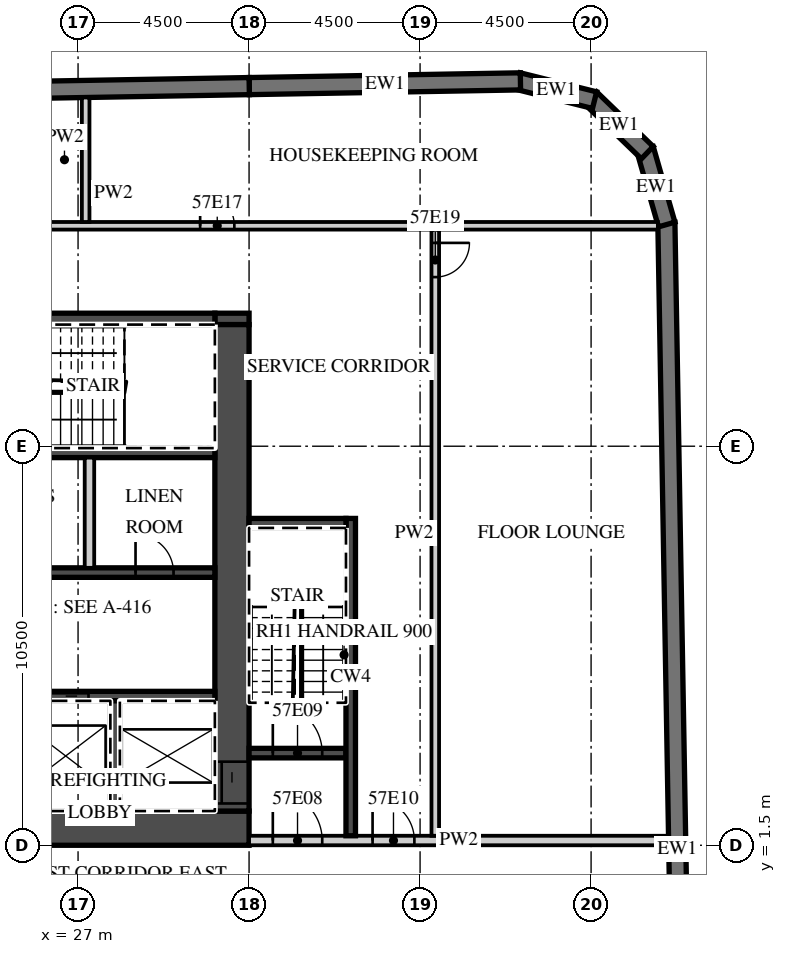
"""IFC4 building model, lengths in metres.
Left out: names, types, materials, properties, quantities, classifications, styles, units other than length and angle.
Written with IfcOpenShell. Run it as: python <this file> out.ifc"""

import sys

from ifc_helpers import new_model, si_unit, direction, frame, frame_2d, origin, place, context, subcontext, project, spatial, polyline, rectangle, outline, extrude, element, fill, save


model = new_model("IFC4")
c1 = context("Model", 3, precision=1e-05, world=origin(), true_north=direction((0.0, 1.0)))
c2 = subcontext(c1, "Body", "Model", "MODEL_VIEW")
j1 = project(units=[si_unit("LENGTHUNIT", "METRE"), si_unit("PLANEANGLEUNIT", "RADIAN")], contexts=[c1])
p1 = place(None, origin())
s1 = spatial("IfcSite", under=j1, at=p1, CompositionType="ELEMENT")
p2 = place(p1, origin())
s2 = spatial("IfcBuilding", under=s1, at=p2, CompositionType="ELEMENT")
p3 = place(p2, frame((0.0, 0.0, 234.2)))
s3 = spatial("IfcBuildingStorey", under=s2, at=p3, CompositionType="ELEMENT", Elevation=234.2)
p4 = place(p3, frame((43.057, -15.103, 0.0), z_axis=(0.0, 0.0, 1.0), x_axis=(-0.017452408953, 0.999847695112, 0.0)))
e1 = element("IfcWall", 1, at=p4, inside=s3, PredefinedType="SOLIDWALL", context=c2, shape_type="SweptSolid", body=[
    extrude(rectangle(XDim=33.0, YDim=0.45, at=frame_2d((16.5, 0.0))), origin(), (0.0, 0.0, 1.0), 3.02),
])
p5 = place(p3, frame((42.49, 17.833, 0.0), z_axis=(0.0, 0.0, 1.0), x_axis=(-0.275546368831, 0.961287781377, 0.0)))
e2 = element("IfcWall", 2, at=p5, inside=s3, PredefinedType="SOLIDWALL", context=c2, shape_type="SweptSolid", body=[
    extrude(outline(polyline([(0.0, -0.225), (2.071, -0.225), (1.95, 0.225), (0.121, 0.225), (0.0, -0.225)])), origin(), (0.0, 0.0, 1.0), 3.02),
])
p6 = place(p3, frame((41.979, 19.724, 0.0), z_axis=(0.0, 0.0, 1.0), x_axis=(-0.719379111448, 0.694617660308, 0.0)))
e3 = element("IfcWall", 3, at=p6, inside=s3, PredefinedType="SOLIDWALL", context=c2, shape_type="SweptSolid", body=[
    extrude(outline(polyline([(0.0, -0.225), (2.071, -0.225), (1.95, 0.225), (0.121, 0.225), (0.0, -0.225)])), origin(), (0.0, 0.0, 1.0), 3.02),
])
p7 = place(p3, frame((40.591, 21.106, 0.0), z_axis=(0.0, 0.0, 1.0), x_axis=(-0.970287979719, 0.241952963225, 0.0)))
e4 = element("IfcWall", 4, at=p7, inside=s3, PredefinedType="SOLIDWALL", context=c2, shape_type="SweptSolid", body=[
    extrude(outline(polyline([(0.0, -0.225), (2.071, -0.225), (1.95, 0.225), (0.121, 0.225), (0.0, -0.225)])), origin(), (0.0, 0.0, 1.0), 3.02),
])
p8 = place(p3, frame((38.641, 21.6, 0.0), z_axis=(0.0, 0.0, 1.0), x_axis=(-0.999847245074, -0.017478172627, 0.0)))
e5 = element("IfcWall", 5, at=p8, inside=s3, PredefinedType="SOLIDWALL", context=c2, shape_type="SweptSolid", body=[
    extrude(rectangle(XDim=7.138, YDim=0.45, at=frame_2d((3.569, 0.0))), origin(), (0.0, 0.0, 1.0), 3.02),
])
p9 = place(p3, frame((31.504, 21.476, 0.0), z_axis=(0.0, 0.0, 1.0), x_axis=(-0.999847677887, -0.017453395744, 0.0)))
e6 = element("IfcWall", 6, at=p9, inside=s3, PredefinedType="SOLIDWALL", context=c2, shape_type="SweptSolid", body=[
    extrude(rectangle(XDim=18.003, YDim=0.45, at=frame_2d((9.001, 0.0))), origin(), (0.0, 0.0, 1.0), 3.02),
])
p10 = place(p3, frame((13.5, 1.95, 0.0), z_axis=(0.0, 0.0, 1.0), x_axis=(1.0, 0.0, 0.0)))
e7 = element("IfcWall", 7, at=p10, inside=s3, PredefinedType="SHEAR", context=c2, shape_type="SweptSolid", body=[
    extrude(rectangle(XDim=18.0, YDim=0.9, at=frame_2d((9.0, 0.0))), origin(), (0.0, 0.0, 1.0), 3.02),
])
p11 = place(p10, frame((1.475, 0.0, 0.0)))
e8 = element("IfcOpeningElement", 8, at=p11, cuts=e7, PredefinedType="OPENING", context=c2, shape_type="SweptSolid", body=[
    extrude(rectangle(XDim=1.8, YDim=2.1, at=frame_2d((0.9, 1.05))), frame((0.0, 0.46, 0.0), z_axis=(0.0, -1.0, 0.0), x_axis=(1.0, 0.0, 0.0)), (0.0, 0.0, 1.0), 0.92),
])
p12 = place(p3, frame((30.6, 15.35, 0.0), z_axis=(0.0, 0.0, 1.0), x_axis=(1.0, 0.0, 0.0)))
e9 = element("IfcWall", 9, at=p12, inside=s3, PredefinedType="SHEAR", context=c2, shape_type="SweptSolid", body=[
    extrude(rectangle(XDim=0.9, YDim=0.3, at=frame_2d((0.45, 0.0))), origin(), (0.0, 0.0, 1.0), 3.02),
])
p13 = place(p3, frame((20.3, 15.35, 0.0), z_axis=(0.0, 0.0, 1.0), x_axis=(1.0, 0.0, 0.0)))
e10 = element("IfcWall", 10, at=p13, inside=s3, PredefinedType="SHEAR", context=c2, shape_type="SweptSolid", body=[
    extrude(rectangle(XDim=10.3, YDim=0.3, at=frame_2d((5.15, 0.0))), origin(), (0.0, 0.0, 1.0), 3.02),
])
p14 = place(p13, frame((4.0, 0.0, 0.0)))
e11 = element("IfcOpeningElement", 11, at=p14, cuts=e10, PredefinedType="OPENING", context=c2, shape_type="SweptSolid", body=[
    extrude(rectangle(XDim=1.3, YDim=2.1, at=frame_2d((0.65, 1.05))), frame((0.0, 0.16, 0.0), z_axis=(0.0, -1.0, 0.0), x_axis=(1.0, 0.0, 0.0)), (0.0, 0.0, 1.0), 0.32),
])
p15 = place(p13, frame((2.288, 0.0, 0.0)))
e12 = element("IfcOpeningElement", 12, at=p15, cuts=e10, PredefinedType="OPENING", context=c2, shape_type="SweptSolid", body=[
    extrude(rectangle(XDim=0.9, YDim=2.1, at=frame_2d((0.45, 1.05))), frame((0.0, 0.16, 0.0), z_axis=(0.0, -1.0, 0.0), x_axis=(1.0, 0.0, 0.0)), (0.0, 0.0, 1.0), 0.32),
])
p16 = place(p13, frame((0.462, 0.0, 0.0)))
e13 = element("IfcOpeningElement", 13, at=p16, cuts=e10, PredefinedType="OPENING", context=c2, shape_type="SweptSolid", body=[
    extrude(rectangle(XDim=0.9, YDim=2.1, at=frame_2d((0.45, 1.05))), frame((0.0, 0.16, 0.0), z_axis=(0.0, -1.0, 0.0), x_axis=(1.0, 0.0, 0.0)), (0.0, 0.0, 1.0), 0.32),
])
p17 = place(p3, frame((31.05, 2.4, 0.0), z_axis=(0.0, 0.0, 1.0), x_axis=(0.0, 1.0, 0.0)))
e14 = element("IfcWall", 14, at=p17, inside=s3, PredefinedType="SHEAR", context=c2, shape_type="SweptSolid", body=[
    extrude(rectangle(XDim=12.8, YDim=0.9, at=frame_2d((6.4, 0.0))), origin(), (0.0, 0.0, 1.0), 3.02),
])
p18 = place(p17, frame((0.2, 0.0, 0.0)))
e15 = element("IfcOpeningElement", 15, at=p18, cuts=e14, PredefinedType="OPENING", context=c2, shape_type="SweptSolid", body=[
    extrude(rectangle(XDim=1.1, YDim=2.1, at=frame_2d((0.55, 1.05))), frame((0.0, 0.46, 0.0), z_axis=(0.0, -1.0, 0.0), x_axis=(1.0, 0.0, 0.0)), (0.0, 0.0, 1.0), 0.92),
])
p19 = place(p3, frame((17.6, 5.425, 0.0), z_axis=(0.0, 0.0, 1.0), x_axis=(1.0, 0.0, 0.0)))
e16 = element("IfcWall", 16, at=p19, inside=s3, PredefinedType="SHEAR", context=c2, shape_type="SweptSolid", body=[
    extrude(rectangle(XDim=13.0, YDim=0.25, at=frame_2d((6.5, 0.0))), origin(), (0.0, 0.0, 1.0), 3.02),
])
p20 = place(p19, frame((8.475, 0.0, 0.0)))
e17 = element("IfcOpeningElement", 17, at=p20, cuts=e16, PredefinedType="OPENING", context=c2, shape_type="SweptSolid", body=[
    extrude(rectangle(XDim=1.2, YDim=2.1, at=frame_2d((0.6, 1.05))), frame((0.0, 0.135, 0.0), z_axis=(0.0, -1.0, 0.0), x_axis=(1.0, 0.0, 0.0)), (0.0, 0.0, 1.0), 0.27),
])
p21 = place(p19, frame((5.875, 0.0, 0.0)))
e18 = element("IfcOpeningElement", 18, at=p21, cuts=e16, PredefinedType="OPENING", context=c2, shape_type="SweptSolid", body=[
    extrude(rectangle(XDim=1.2, YDim=2.1, at=frame_2d((0.6, 1.05))), frame((0.0, 0.135, 0.0), z_axis=(0.0, -1.0, 0.0), x_axis=(1.0, 0.0, 0.0)), (0.0, 0.0, 1.0), 0.27),
])
p22 = place(p3, frame((27.975, 2.4, 0.0), z_axis=(0.0, 0.0, 1.0), x_axis=(0.0, 1.0, 0.0)))
e19 = element("IfcWall", 19, at=p22, inside=s3, PredefinedType="SHEAR", context=c2, shape_type="SweptSolid", body=[
    extrude(rectangle(XDim=2.9, YDim=0.25, at=frame_2d((1.45, 0.0))), origin(), (0.0, 0.0, 1.0), 3.02),
])
p23 = place(p3, frame((14.4, 8.675, 0.0), z_axis=(0.0, 0.0, 1.0), x_axis=(1.0, 0.0, 0.0)))
e20 = element("IfcWall", 20, at=p23, inside=s3, PredefinedType="SHEAR", context=c2, shape_type="SweptSolid", body=[
    extrude(rectangle(XDim=16.2, YDim=0.25, at=frame_2d((8.1, 0.0))), origin(), (0.0, 0.0, 1.0), 3.02),
])
p24 = place(p23, frame((6.45, 0.0, 0.0)))
e21 = element("IfcOpeningElement", 21, at=p24, cuts=e20, PredefinedType="OPENING", context=c2, shape_type="SweptSolid", body=[
    extrude(rectangle(XDim=1.2, YDim=2.1, at=frame_2d((0.6, 1.05))), frame((0.0, 0.135, 0.0), z_axis=(0.0, -1.0, 0.0), x_axis=(1.0, 0.0, 0.0)), (0.0, 0.0, 1.0), 0.27),
])
p25 = place(p23, frame((3.8, 0.0, 0.0)))
e22 = element("IfcOpeningElement", 22, at=p25, cuts=e20, PredefinedType="OPENING", context=c2, shape_type="SweptSolid", body=[
    extrude(rectangle(XDim=1.2, YDim=2.1, at=frame_2d((0.6, 1.05))), frame((0.0, 0.135, 0.0), z_axis=(0.0, -1.0, 0.0), x_axis=(1.0, 0.0, 0.0)), (0.0, 0.0, 1.0), 0.27),
])
p26 = place(p23, frame((0.65, 0.0, 0.0)))
e23 = element("IfcOpeningElement", 23, at=p26, cuts=e20, PredefinedType="OPENING", context=c2, shape_type="SweptSolid", body=[
    extrude(rectangle(XDim=1.3, YDim=2.1, at=frame_2d((0.65, 1.05))), frame((0.0, 0.135, 0.0), z_axis=(0.0, -1.0, 0.0), x_axis=(1.0, 0.0, 0.0)), (0.0, 0.0, 1.0), 0.27),
])
p27 = place(p23, frame((14.113, 0.0, 0.0)))
e24 = element("IfcOpeningElement", 24, at=p27, cuts=e20, PredefinedType="OPENING", context=c2, shape_type="SweptSolid", body=[
    extrude(rectangle(XDim=1.0, YDim=2.1, at=frame_2d((0.5, 1.05))), frame((0.0, 0.135, 0.0), z_axis=(0.0, -1.0, 0.0), x_axis=(1.0, 0.0, 0.0)), (0.0, 0.0, 1.0), 0.27),
])
p28 = place(p23, frame((10.137, 0.0, 0.0)))
e25 = element("IfcOpeningElement", 25, at=p28, cuts=e20, PredefinedType="OPENING", context=c2, shape_type="SweptSolid", body=[
    extrude(rectangle(XDim=1.0, YDim=2.1, at=frame_2d((0.5, 1.05))), frame((0.0, 0.135, 0.0), z_axis=(0.0, -1.0, 0.0), x_axis=(1.0, 0.0, 0.0)), (0.0, 0.0, 1.0), 0.27),
])
p29 = place(p3, frame((17.35, 11.825, 0.0), z_axis=(0.0, 0.0, 1.0), x_axis=(1.0, 0.0, 0.0)))
e26 = element("IfcWall", 26, at=p29, inside=s3, PredefinedType="SHEAR", context=c2, shape_type="SweptSolid", body=[
    extrude(rectangle(XDim=13.25, YDim=0.25, at=frame_2d((6.625, 0.0))), origin(), (0.0, 0.0, 1.0), 3.02),
])
p30 = place(p3, frame((27.3, 8.8, 0.0), z_axis=(0.0, 0.0, 1.0), x_axis=(0.0, 1.0, 0.0)))
e27 = element("IfcWall", 27, at=p30, inside=s3, PredefinedType="PARTITIONING", context=c2, shape_type="SweptSolid", body=[
    extrude(rectangle(XDim=2.9, YDim=0.25, at=frame_2d((1.45, 0.0))), origin(), (0.0, 0.0, 1.0), 3.02),
])
p31 = place(p3, frame((31.5, 1.625, 0.0), z_axis=(0.0, 0.0, 1.0), x_axis=(1.0, 0.0, 0.0)))
e28 = element("IfcWall", 28, at=p31, inside=s3, PredefinedType="PARTITIONING", context=c2, shape_type="SweptSolid", body=[
    extrude(rectangle(XDim=11.04, YDim=0.25, at=frame_2d((5.52, 0.0))), origin(), (0.0, 0.0, 1.0), 3.02),
])
p32 = place(p31, frame((0.625, 0.0, 0.0)))
e29 = element("IfcOpeningElement", 29, at=p32, cuts=e28, PredefinedType="OPENING", context=c2, shape_type="SweptSolid", body=[
    extrude(rectangle(XDim=1.3, YDim=2.1, at=frame_2d((0.65, 1.05))), frame((0.0, 0.135, 0.0), z_axis=(0.0, -1.0, 0.0), x_axis=(1.0, 0.0, 0.0)), (0.0, 0.0, 1.0), 0.27),
])
p33 = place(p31, frame((3.25, 0.0, 0.0)))
e30 = element("IfcOpeningElement", 30, at=p33, cuts=e28, PredefinedType="OPENING", context=c2, shape_type="SweptSolid", body=[
    extrude(rectangle(XDim=1.1, YDim=2.1, at=frame_2d((0.55, 1.05))), frame((0.0, 0.135, 0.0), z_axis=(0.0, -1.0, 0.0), x_axis=(1.0, 0.0, 0.0)), (0.0, 0.0, 1.0), 0.27),
])
p34 = place(p3, frame((31.5, 3.925, 0.0), z_axis=(0.0, 0.0, 1.0), x_axis=(1.0, 0.0, 0.0)))
e31 = element("IfcWall", 31, at=p34, inside=s3, PredefinedType="SHEAR", context=c2, shape_type="SweptSolid", body=[
    extrude(rectangle(XDim=2.55, YDim=0.25, at=frame_2d((1.275, 0.0))), origin(), (0.0, 0.0, 1.0), 3.02),
])
p35 = place(p34, frame((0.625, 0.0, 0.0)))
e32 = element("IfcOpeningElement", 32, at=p35, cuts=e31, PredefinedType="OPENING", context=c2, shape_type="SweptSolid", body=[
    extrude(rectangle(XDim=1.3, YDim=2.1, at=frame_2d((0.65, 1.05))), frame((0.0, 0.135, 0.0), z_axis=(0.0, -1.0, 0.0), x_axis=(1.0, 0.0, 0.0)), (0.0, 0.0, 1.0), 0.27),
])
p36 = place(p3, frame((34.175, 1.75, 0.0), z_axis=(0.0, 0.0, 1.0), x_axis=(0.0, 1.0, 0.0)))
e33 = element("IfcWall", 33, at=p36, inside=s3, PredefinedType="SHEAR", context=c2, shape_type="SweptSolid", body=[
    extrude(rectangle(XDim=8.35, YDim=0.25, at=frame_2d((4.175, 0.0))), origin(), (0.0, 0.0, 1.0), 3.02),
])
p37 = place(p3, frame((31.5, 9.975, 0.0), z_axis=(0.0, 0.0, 1.0), x_axis=(1.0, 0.0, 0.0)))
e34 = element("IfcWall", 34, at=p37, inside=s3, PredefinedType="SHEAR", context=c2, shape_type="SweptSolid", body=[
    extrude(rectangle(XDim=2.55, YDim=0.25, at=frame_2d((1.275, 0.0))), origin(), (0.0, 0.0, 1.0), 3.02),
])
p38 = place(p3, frame((36.4, 1.75, 0.0), z_axis=(0.0, 0.0, 1.0), x_axis=(0.0, 1.0, 0.0)))
e35 = element("IfcWall", 35, at=p38, inside=s3, PredefinedType="PARTITIONING", context=c2, shape_type="SweptSolid", body=[
    extrude(rectangle(XDim=15.95, YDim=0.2, at=frame_2d((7.975, 0.0))), origin(), (0.0, 0.0, 1.0), 3.02),
])
p39 = place(p38, frame((14.7, 0.0, 0.0)))
e36 = element("IfcOpeningElement", 36, at=p39, cuts=e35, PredefinedType="OPENING", context=c2, shape_type="SweptSolid", body=[
    extrude(rectangle(XDim=0.9, YDim=2.1, at=frame_2d((0.45, 1.05))), frame((0.0, 0.11, 0.0), z_axis=(0.0, -1.0, 0.0), x_axis=(1.0, 0.0, 0.0)), (0.0, 0.0, 1.0), 0.22),
])
p40 = place(p3, frame((13.6, 17.8, 0.0), z_axis=(0.0, 0.0, 1.0), x_axis=(1.0, 0.0, 0.0)))
e37 = element("IfcWall", 37, at=p40, inside=s3, PredefinedType="PARTITIONING", context=c2, shape_type="SweptSolid", body=[
    extrude(rectangle(XDim=28.657, YDim=0.2, at=frame_2d((14.329, 0.0))), origin(), (0.0, 0.0, 1.0), 3.02),
])
p41 = place(p40, frame((16.613, 0.0, 0.0)))
e38 = element("IfcOpeningElement", 38, at=p41, cuts=e37, PredefinedType="OPENING", context=c2, shape_type="SweptSolid", body=[
    extrude(rectangle(XDim=0.9, YDim=2.1, at=frame_2d((0.45, 1.05))), frame((0.0, 0.11, 0.0), z_axis=(0.0, -1.0, 0.0), x_axis=(1.0, 0.0, 0.0)), (0.0, 0.0, 1.0), 0.22),
])
p42 = place(p40, frame((8.312, 0.0, 0.0)))
e39 = element("IfcOpeningElement", 39, at=p42, cuts=e37, PredefinedType="OPENING", context=c2, shape_type="SweptSolid", body=[
    extrude(rectangle(XDim=0.9, YDim=2.1, at=frame_2d((0.45, 1.05))), frame((0.0, 0.11, 0.0), z_axis=(0.0, -1.0, 0.0), x_axis=(1.0, 0.0, 0.0)), (0.0, 0.0, 1.0), 0.22),
])
p43 = place(p3, frame((27.2, 17.9, 0.0), z_axis=(0.0, 0.0, 1.0), x_axis=(0.0, 1.0, 0.0)))
e40 = element("IfcWall", 40, at=p43, inside=s3, PredefinedType="PARTITIONING", context=c2, shape_type="SweptSolid", body=[
    extrude(rectangle(XDim=3.276, YDim=0.2, at=frame_2d((1.638, 0.0))), origin(), (0.0, 0.0, 1.0), 3.02),
])
p44 = place(p20, origin())
e41 = element("IfcDoor", 41, at=p44, inside=s3, OperationType="SLIDING_TO_LEFT", PredefinedType="DOOR", context=c2, shape_type="SweptSolid", body=[
    extrude(rectangle(XDim=1.2, YDim=2.1, at=frame_2d((0.6, 1.05))), frame((0.0, 0.025, 0.0), z_axis=(0.0, -1.0, 0.0), x_axis=(1.0, 0.0, 0.0)), (0.0, 0.0, 1.0), 0.05),
])
fill(e17, e41)
p45 = place(p18, origin())
e42 = element("IfcDoor", 42, at=p45, inside=s3, OperationType="SLIDING_TO_LEFT", PredefinedType="DOOR", context=c2, shape_type="SweptSolid", body=[
    extrude(rectangle(XDim=1.1, YDim=2.1, at=frame_2d((0.55, 1.05))), frame((0.0, 0.025, 0.0), z_axis=(0.0, -1.0, 0.0), x_axis=(1.0, 0.0, 0.0)), (0.0, 0.0, 1.0), 0.05),
])
fill(e15, e42)
p46 = place(p32, origin())
e43 = element("IfcDoor", 43, at=p46, inside=s3, OperationType="SINGLE_SWING_LEFT", PredefinedType="DOOR", context=c2, shape_type="SweptSolid", body=[
    extrude(rectangle(XDim=1.3, YDim=2.1, at=frame_2d((0.65, 1.05))), frame((0.0, 0.025, 0.0), z_axis=(0.0, -1.0, 0.0), x_axis=(1.0, 0.0, 0.0)), (0.0, 0.0, 1.0), 0.05),
])
fill(e29, e43)
p47 = place(p35, origin())
e44 = element("IfcDoor", 44, at=p47, inside=s3, OperationType="SINGLE_SWING_LEFT", PredefinedType="DOOR", context=c2, shape_type="SweptSolid", body=[
    extrude(rectangle(XDim=1.3, YDim=2.1, at=frame_2d((0.65, 1.05))), frame((0.0, 0.025, 0.0), z_axis=(0.0, -1.0, 0.0), x_axis=(1.0, 0.0, 0.0)), (0.0, 0.0, 1.0), 0.05),
])
fill(e32, e44)
p48 = place(p33, origin())
e45 = element("IfcDoor", 45, at=p48, inside=s3, OperationType="SINGLE_SWING_LEFT", PredefinedType="DOOR", context=c2, shape_type="SweptSolid", body=[
    extrude(rectangle(XDim=1.1, YDim=2.1, at=frame_2d((0.55, 1.05))), frame((0.0, 0.025, 0.0), z_axis=(0.0, -1.0, 0.0), x_axis=(1.0, 0.0, 0.0)), (0.0, 0.0, 1.0), 0.05),
])
fill(e30, e45)
p49 = place(p27, origin())
e46 = element("IfcDoor", 46, at=p49, inside=s3, OperationType="SINGLE_SWING_LEFT", PredefinedType="DOOR", context=c2, shape_type="SweptSolid", body=[
    extrude(rectangle(XDim=1.0, YDim=2.1, at=frame_2d((0.5, 1.05))), frame((0.0, 0.025, 0.0), z_axis=(0.0, -1.0, 0.0), x_axis=(1.0, 0.0, 0.0)), (0.0, 0.0, 1.0), 0.05),
])
fill(e24, e46)
p50 = place(p41, origin())
e47 = element("IfcDoor", 47, at=p50, inside=s3, OperationType="SINGLE_SWING_LEFT", PredefinedType="DOOR", context=c2, shape_type="SweptSolid", body=[
    extrude(rectangle(XDim=0.9, YDim=2.1, at=frame_2d((0.45, 1.05))), frame((0.0, 0.025, 0.0), z_axis=(0.0, -1.0, 0.0), x_axis=(1.0, 0.0, 0.0)), (0.0, 0.0, 1.0), 0.05),
])
fill(e38, e47)
p51 = place(p39, origin())
e48 = element("IfcDoor", 48, at=p51, inside=s3, OperationType="SINGLE_SWING_RIGHT", PredefinedType="DOOR", context=c2, shape_type="SweptSolid", body=[
    extrude(rectangle(XDim=0.9, YDim=2.1, at=frame_2d((0.45, 1.05))), frame((0.0, 0.025, 0.0), z_axis=(0.0, -1.0, 0.0), x_axis=(1.0, 0.0, 0.0)), (0.0, 0.0, 1.0), 0.05),
])
fill(e36, e48)
save(model, sys.argv[1])
